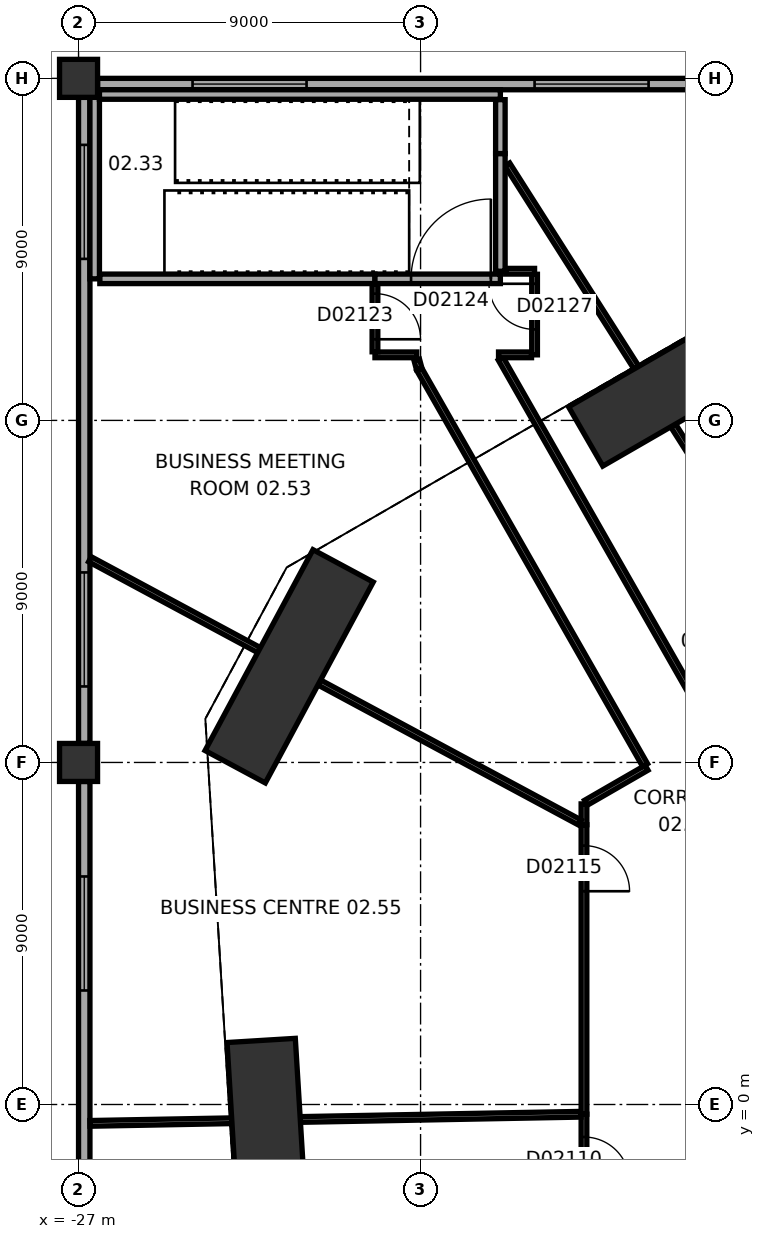
"""IFC4 building model, lengths in metres.
Left out: names, types, materials, properties, quantities, classifications, styles, units other than length and angle.
Written with IfcOpenShell. Run it as: python <this file> out.ifc"""

import sys

from ifc_helpers import new_model, si_unit, direction, frame, frame_2d, origin, origin_2d, place, context, subcontext, project, spatial, rectangle, extrude, element, fill, save


model = new_model("IFC4")
c1 = context("Model", 3, precision=1e-05, world=origin(), true_north=direction((0.0, 1.0)))
c2 = subcontext(c1, "Body", "Model", "MODEL_VIEW")
j1 = project(units=[si_unit("LENGTHUNIT", "METRE"), si_unit("PLANEANGLEUNIT", "RADIAN")], contexts=[c1])
p1 = place(None, origin())
s1 = spatial("IfcSite", under=j1, at=p1, CompositionType="ELEMENT")
p2 = place(p1, origin())
s2 = spatial("IfcBuilding", under=s1, at=p2, CompositionType="ELEMENT")
p3 = place(p2, frame((0.0, 0.0, 13.0)))
s3 = spatial("IfcBuildingStorey", under=s2, at=p3, CompositionType="ELEMENT", Elevation=13.0)
p4 = place(p3, frame((-11.837, 18.627, 0.0), z_axis=(0.0, 0.0, 1.0), x_axis=(-0.866028021766, -0.499995465495, 0.0)))
e1 = element("IfcColumn", 1, at=p4, inside=s3, PredefinedType="COLUMN", context=c2, shape_type="SweptSolid", body=[
    extrude(rectangle(XDim=4.2, YDim=1.8, at=origin_2d()), origin(), (0.0, 0.0, 1.0), 8.0),
])
p5 = place(p3, frame((-21.458, 11.53, 0.0), z_axis=(0.0, 0.0, 1.0), x_axis=(-0.473316592293, -0.880892390397, 0.0)))
e2 = element("IfcColumn", 2, at=p5, inside=s3, PredefinedType="COLUMN", context=c2, shape_type="SweptSolid", body=[
    extrude(rectangle(XDim=6.0, YDim=1.8, at=origin_2d()), origin(), (0.0, 0.0, 1.0), 8.0),
])
p6 = place(p3, frame((-22.066, -0.411, 0.0), z_axis=(0.0, 0.0, 1.0), x_axis=(0.061046797461, -0.99813490497, 0.0)))
e3 = element("IfcColumn", 3, at=p6, inside=s3, PredefinedType="COLUMN", context=c2, shape_type="SweptSolid", body=[
    extrude(rectangle(XDim=4.2, YDim=1.8, at=origin_2d()), origin(), (0.0, 0.0, 1.0), 8.0),
])
for number, where, z_axis, x_axis in (
    (4, (-27.0, 9.0, 0.0), (0.0, 0.0, 1.0), (1.0, 0.0, 0.0)),
    (5, (-27.0, 27.0, 0.0), (0.0, 0.0, 1.0), (1.0, 0.0, 0.0)),
):
    element("IfcColumn", number, at=place(p3, frame(where, z_axis=z_axis, x_axis=x_axis)), inside=s3, PredefinedType="COLUMN", context=c2, shape_type="SweptSolid", body=[
        extrude(rectangle(XDim=1.0, YDim=1.0, at=origin_2d()), origin(), (0.0, 0.0, 1.0), 8.0),
    ])
p7 = place(p3, frame((-9.5, 26.85, 0.0), z_axis=(0.0, 0.0, 1.0), x_axis=(-1.0, 0.0, 0.0)))
e6 = element("IfcWall", 6, at=p7, inside=s3, PredefinedType="STANDARD", context=c2, shape_type="SweptSolid", body=[
    extrude(rectangle(XDim=17.0, YDim=0.3, at=frame_2d((8.5, 0.0))), origin(), (0.0, 0.0, 1.0), 6.5),
])
p8 = place(p7, frame((2.5, 0.0, 1.0)))
e7 = element("IfcOpeningElement", 7, at=p8, cuts=e6, PredefinedType="OPENING", context=c2, shape_type="SweptSolid", body=[
    extrude(rectangle(XDim=3.0, YDim=4.0, at=frame_2d((1.5, 2.0))), frame((0.0, 0.16, 0.0), z_axis=(0.0, -1.0, 0.0), x_axis=(1.0, 0.0, 0.0)), (0.0, 0.0, 1.0), 0.32),
])
p9 = place(p7, frame((11.5, 0.0, 1.0)))
e8 = element("IfcOpeningElement", 8, at=p9, cuts=e6, PredefinedType="OPENING", context=c2, shape_type="SweptSolid", body=[
    extrude(rectangle(XDim=3.0, YDim=4.0, at=frame_2d((1.5, 2.0))), frame((0.0, 0.16, 0.0), z_axis=(0.0, -1.0, 0.0), x_axis=(1.0, 0.0, 0.0)), (0.0, 0.0, 1.0), 0.32),
])
p10 = place(p3, frame((-26.85, 26.5, 0.0), z_axis=(0.0, 0.0, 1.0), x_axis=(0.0, -1.0, 0.0)))
e9 = element("IfcWall", 9, at=p10, inside=s3, PredefinedType="STANDARD", context=c2, shape_type="SweptSolid", body=[
    extrude(rectangle(XDim=17.0, YDim=0.3, at=frame_2d((8.5, 0.0))), origin(), (0.0, 0.0, 1.0), 6.5),
])
p11 = place(p10, frame((1.25, 0.0, 1.0)))
e10 = element("IfcOpeningElement", 10, at=p11, cuts=e9, PredefinedType="OPENING", context=c2, shape_type="SweptSolid", body=[
    extrude(rectangle(XDim=3.0, YDim=4.0, at=frame_2d((1.5, 2.0))), frame((0.0, 0.16, 0.0), z_axis=(0.0, -1.0, 0.0), x_axis=(1.0, 0.0, 0.0)), (0.0, 0.0, 1.0), 0.32),
])
p12 = place(p10, frame((12.5, 0.0, 1.0)))
e11 = element("IfcOpeningElement", 11, at=p12, cuts=e9, PredefinedType="OPENING", context=c2, shape_type="SweptSolid", body=[
    extrude(rectangle(XDim=3.0, YDim=4.0, at=frame_2d((1.5, 2.0))), frame((0.0, 0.16, 0.0), z_axis=(0.0, -1.0, 0.0), x_axis=(1.0, 0.0, 0.0)), (0.0, 0.0, 1.0), 0.32),
])
p13 = place(p3, frame((-26.85, 8.5, 0.0), z_axis=(0.0, 0.0, 1.0), x_axis=(0.0, -1.0, 0.0)))
e12 = element("IfcWall", 12, at=p13, inside=s3, PredefinedType="STANDARD", context=c2, shape_type="SweptSolid", body=[
    extrude(rectangle(XDim=17.0, YDim=0.3, at=frame_2d((8.5, 0.0))), origin(), (0.0, 0.0, 1.0), 6.5),
])
p14 = place(p13, frame((2.5, 0.0, 1.0)))
e13 = element("IfcOpeningElement", 13, at=p14, cuts=e12, PredefinedType="OPENING", context=c2, shape_type="SweptSolid", body=[
    extrude(rectangle(XDim=3.0, YDim=4.0, at=frame_2d((1.5, 2.0))), frame((0.0, 0.16, 0.0), z_axis=(0.0, -1.0, 0.0), x_axis=(1.0, 0.0, 0.0)), (0.0, 0.0, 1.0), 0.32),
])
p15 = place(p13, frame((11.5, 0.0, 1.0)))
e14 = element("IfcOpeningElement", 14, at=p15, cuts=e12, PredefinedType="OPENING", context=c2, shape_type="SweptSolid", body=[
    extrude(rectangle(XDim=3.0, YDim=4.0, at=frame_2d((1.5, 2.0))), frame((0.0, 0.16, 0.0), z_axis=(0.0, -1.0, 0.0), x_axis=(1.0, 0.0, 0.0)), (0.0, 0.0, 1.0), 0.32),
])
p16 = place(p3, frame((-13.7, -7.909, 0.0), z_axis=(0.0, 0.0, 1.0), x_axis=(0.0, 1.0, 0.0)))
e15 = element("IfcWall", 15, at=p16, inside=s3, PredefinedType="PARTITIONING", context=c2, shape_type="SweptSolid", body=[
    extrude(rectangle(XDim=7.655, YDim=0.15, at=frame_2d((3.827, 0.0))), origin(), (0.0, 0.0, 1.0), 7.7),
])
p17 = place(p16, frame((5.854, 0.0, 0.0)))
e16 = element("IfcOpeningElement", 16, at=p17, cuts=e15, PredefinedType="OPENING", context=c2, shape_type="SweptSolid", body=[
    extrude(rectangle(XDim=1.2, YDim=2.1, at=frame_2d((0.6, 1.05))), frame((0.0, 0.085, 0.0), z_axis=(0.0, -1.0, 0.0), x_axis=(1.0, 0.0, 0.0)), (0.0, 0.0, 1.0), 0.17),
])
p18 = place(p3, frame((-22.967, -0.427, 0.0), z_axis=(0.0, 0.0, 1.0), x_axis=(-0.999826372694, -0.018633959993, 0.0)))
e17 = element("IfcWall", 17, at=p18, inside=s3, PredefinedType="PARTITIONING", context=c2, shape_type="SweptSolid", body=[
    extrude(rectangle(XDim=3.734, YDim=0.15, at=frame_2d((1.867, 0.0))), origin(), (0.0, 0.0, 1.0), 7.7),
])
p19 = place(p3, frame((-13.78, -0.257, 0.0), z_axis=(0.0, 0.0, 1.0), x_axis=(-0.999826849708, -0.018608347649, 0.0)))
e18 = element("IfcWall", 18, at=p19, inside=s3, PredefinedType="PARTITIONING", context=c2, shape_type="SweptSolid", body=[
    extrude(rectangle(XDim=7.386, YDim=0.15, at=frame_2d((3.693, 0.0))), origin(), (0.0, 0.0, 1.0), 7.7),
])
p20 = place(p3, frame((-13.7, -0.255, 0.0), z_axis=(0.0, 0.0, 1.0), x_axis=(0.0, 1.0, 0.0)))
e19 = element("IfcWall", 19, at=p20, inside=s3, PredefinedType="PARTITIONING", context=c2, shape_type="SweptSolid", body=[
    extrude(rectangle(XDim=7.616, YDim=0.15, at=frame_2d((3.808, 0.0))), origin(), (0.0, 0.0, 1.0), 7.7),
])
p21 = place(p20, frame((5.866, 0.0, 0.0)))
e20 = element("IfcOpeningElement", 20, at=p21, cuts=e19, PredefinedType="OPENING", context=c2, shape_type="SweptSolid", body=[
    extrude(rectangle(XDim=1.2, YDim=2.1, at=frame_2d((0.6, 1.05))), frame((0.0, 0.085, 0.0), z_axis=(0.0, -1.0, 0.0), x_axis=(1.0, 0.0, 0.0)), (0.0, 0.0, 1.0), 0.17),
])
p22 = place(p3, frame((-13.7, 7.362, 0.0), z_axis=(0.0, 0.0, 1.0), x_axis=(0.0, 1.0, 0.0)))
e21 = element("IfcWall", 21, at=p22, inside=s3, PredefinedType="PARTITIONING", context=c2, shape_type="SweptSolid", body=[
    extrude(rectangle(XDim=0.548, YDim=0.15, at=frame_2d((0.274, 0.0))), origin(), (0.0, 0.0, 1.0), 7.7),
])
p23 = place(p3, frame((-13.806, 7.418, 0.0), z_axis=(0.0, 0.0, 1.0), x_axis=(-0.880891557551, 0.473318142305, 0.0)))
e22 = element("IfcWall", 22, at=p23, inside=s3, PredefinedType="PARTITIONING", context=c2, shape_type="SweptSolid", body=[
    extrude(rectangle(XDim=7.787, YDim=0.15, at=frame_2d((3.894, 0.0))), origin(), (0.0, 0.0, 1.0), 7.7),
])
p24 = place(p3, frame((-13.648, 7.939, 0.0), z_axis=(0.0, 0.0, 1.0), x_axis=(0.866024486176, 0.500001589341, 0.0)))
e23 = element("IfcWall", 23, at=p24, inside=s3, PredefinedType="PARTITIONING", context=c2, shape_type="SweptSolid", body=[
    extrude(rectangle(XDim=1.842, YDim=0.15, at=frame_2d((0.921, 0.0))), origin(), (0.0, 0.0, 1.0), 7.7),
])
p25 = place(p3, frame((-12.092, 8.93, 0.0), z_axis=(0.0, 0.0, 1.0), x_axis=(-0.495564220718, 0.868571299977, 0.0)))
e24 = element("IfcWall", 24, at=p25, inside=s3, PredefinedType="PARTITIONING", context=c2, shape_type="SweptSolid", body=[
    extrude(rectangle(XDim=11.988, YDim=0.15, at=frame_2d((5.994, 0.0))), origin(), (0.0, 0.0, 1.0), 7.7),
])
p26 = place(p3, frame((-7.397, 11.641, 0.0), z_axis=(0.0, 0.0, 1.0), x_axis=(-0.536312130721, 0.844019726334, 0.0)))
e25 = element("IfcWall", 25, at=p26, inside=s3, PredefinedType="PARTITIONING", context=c2, shape_type="SweptSolid", body=[
    extrude(rectangle(XDim=7.376, YDim=0.15, at=frame_2d((3.688, 0.0))), origin(), (0.0, 0.0, 1.0), 7.7),
])
p27 = place(p3, frame((-22.251, 11.956, 0.0), z_axis=(0.0, 0.0, 1.0), x_axis=(-0.880902248523, 0.473298244817, 0.0)))
e26 = element("IfcWall", 26, at=p27, inside=s3, PredefinedType="PARTITIONING", context=c2, shape_type="SweptSolid", body=[
    extrude(rectangle(XDim=5.051, YDim=0.15, at=frame_2d((2.525, 0.0))), origin(), (0.0, 0.0, 1.0), 7.7),
])
p28 = place(p3, frame((-18.038, 19.362, 0.0), z_axis=(0.0, 0.0, 1.0), x_axis=(-0.257536433885, 0.966268588552, 0.0)))
e27 = element("IfcWall", 27, at=p28, inside=s3, PredefinedType="PARTITIONING", context=c2, shape_type="SweptSolid", body=[
    extrude(rectangle(XDim=0.241, YDim=0.15, at=frame_2d((0.12, 0.0))), origin(), (0.0, 0.0, 1.0), 7.7),
])
p29 = place(p3, frame((-12.32, 19.387, 0.0), z_axis=(0.0, 0.0, 1.0), x_axis=(-0.536309341483, 0.844021498682, 0.0)))
e28 = element("IfcWall", 28, at=p29, inside=s3, PredefinedType="PARTITIONING", context=c2, shape_type="SweptSolid", body=[
    extrude(rectangle(XDim=6.335, YDim=0.15, at=frame_2d((3.168, 0.0))), origin(), (0.0, 0.0, 1.0), 7.7),
])
p30 = place(p3, frame((-15.889, 19.621, 0.0), z_axis=(0.0, 0.0, 1.0), x_axis=(0.495540263005, -0.868584968636, 0.0)))
e29 = element("IfcWall", 29, at=p30, inside=s3, PredefinedType="PARTITIONING", context=c2, shape_type="SweptSolid", body=[
    extrude(rectangle(XDim=11.157, YDim=0.15, at=frame_2d((5.579, 0.0))), origin(), (0.0, 0.0, 1.0), 7.7),
])
p31 = place(p3, frame((-18.1, 19.725, 0.0), z_axis=(0.0, 0.0, 1.0), x_axis=(-1.0, 0.0, 0.0)))
e30 = element("IfcWall", 30, at=p31, inside=s3, PredefinedType="PARTITIONING", context=c2, shape_type="SweptSolid", body=[
    extrude(rectangle(XDim=1.1, YDim=0.15, at=frame_2d((0.55, 0.0))), origin(), (0.0, 0.0, 1.0), 7.7),
])
p32 = place(p3, frame((-15.08, 19.725, 0.0), z_axis=(0.0, 0.0, 1.0), x_axis=(-1.0, 0.0, 0.0)))
e31 = element("IfcWall", 31, at=p32, inside=s3, PredefinedType="PARTITIONING", context=c2, shape_type="SweptSolid", body=[
    extrude(rectangle(XDim=0.868, YDim=0.15, at=frame_2d((0.434, 0.0))), origin(), (0.0, 0.0, 1.0), 7.7),
])
p33 = place(p3, frame((-19.2, 19.805, 0.0), z_axis=(0.0, 0.0, 1.0), x_axis=(0.0, 1.0, 0.0)))
e32 = element("IfcWall", 32, at=p33, inside=s3, PredefinedType="PARTITIONING", context=c2, shape_type="SweptSolid", body=[
    extrude(rectangle(XDim=1.78, YDim=0.15, at=frame_2d((0.89, 0.0))), origin(), (0.0, 0.0, 1.0), 7.7),
])
p34 = place(p33, frame((0.33, 0.0, 0.0)))
e33 = element("IfcOpeningElement", 33, at=p34, cuts=e32, PredefinedType="OPENING", context=c2, shape_type="SweptSolid", body=[
    extrude(rectangle(XDim=1.2, YDim=2.1, at=frame_2d((0.6, 1.05))), frame((0.0, 0.085, 0.0), z_axis=(0.0, -1.0, 0.0), x_axis=(1.0, 0.0, 0.0)), (0.0, 0.0, 1.0), 0.17),
])
p35 = place(p3, frame((-19.2, 21.725, 0.0), z_axis=(0.0, 0.0, 1.0), x_axis=(-1.0, 0.0, 0.0)))
e34 = element("IfcWall", 34, at=p35, inside=s3, PredefinedType="SOLIDWALL", context=c2, shape_type="SweptSolid", body=[
    extrude(rectangle(XDim=7.24, YDim=0.25, at=frame_2d((3.62, 0.0))), origin(), (0.0, 0.0, 1.0), 7.7),
])
p36 = place(p3, frame((-15.9, 21.725, 0.0), z_axis=(0.0, 0.0, 1.0), x_axis=(-1.0, 0.0, 0.0)))
e35 = element("IfcWall", 35, at=p36, inside=s3, PredefinedType="SOLIDWALL", context=c2, shape_type="SweptSolid", body=[
    extrude(rectangle(XDim=3.3, YDim=0.25, at=frame_2d((1.65, 0.0))), origin(), (0.0, 0.0, 1.0), 7.7),
])
p37 = place(p36, frame((0.25, 0.0, 0.0)))
e36 = element("IfcOpeningElement", 36, at=p37, cuts=e35, PredefinedType="OPENING", context=c2, shape_type="SweptSolid", body=[
    extrude(rectangle(XDim=2.1, YDim=2.4, at=frame_2d((1.05, 1.2))), frame((0.0, 0.135, 0.0), z_axis=(0.0, -1.0, 0.0), x_axis=(1.0, 0.0, 0.0)), (0.0, 0.0, 1.0), 0.27),
])
p38 = place(p3, frame((-15.0, 21.845, 0.0), z_axis=(0.0, 0.0, 1.0), x_axis=(0.0, -1.0, 0.0)))
e37 = element("IfcWall", 37, at=p38, inside=s3, PredefinedType="PARTITIONING", context=c2, shape_type="SweptSolid", body=[
    extrude(rectangle(XDim=2.12, YDim=0.15, at=frame_2d((1.06, 0.0))), origin(), (0.0, 0.0, 1.0), 7.7),
])
p39 = place(p38, frame((0.25, 0.0, 0.0)))
e38 = element("IfcOpeningElement", 38, at=p39, cuts=e37, PredefinedType="OPENING", context=c2, shape_type="SweptSolid", body=[
    extrude(rectangle(XDim=1.2, YDim=2.1, at=frame_2d((0.6, 1.05))), frame((0.0, 0.085, 0.0), z_axis=(0.0, -1.0, 0.0), x_axis=(1.0, 0.0, 0.0)), (0.0, 0.0, 1.0), 0.17),
])
p40 = place(p3, frame((-15.76, 21.925, 0.0), z_axis=(0.0, 0.0, 1.0), x_axis=(1.0, 0.0, 0.0)))
e39 = element("IfcWall", 39, at=p40, inside=s3, PredefinedType="PARTITIONING", context=c2, shape_type="SweptSolid", body=[
    extrude(rectangle(XDim=0.76, YDim=0.15, at=frame_2d((0.38, 0.0))), origin(), (0.0, 0.0, 1.0), 7.7),
])
p41 = place(p3, frame((-15.9, 25.021, 0.0), z_axis=(0.0, 0.0, 1.0), x_axis=(0.0, -1.0, 0.0)))
e40 = element("IfcWall", 40, at=p41, inside=s3, PredefinedType="SOLIDWALL", context=c2, shape_type="SweptSolid", body=[
    extrude(rectangle(XDim=3.096, YDim=0.25, at=frame_2d((1.548, 0.0))), origin(), (0.0, 0.0, 1.0), 7.7),
])
p42 = place(p3, frame((-15.9, 26.44, 0.0), z_axis=(0.0, 0.0, 1.0), x_axis=(0.0, -1.0, 0.0)))
e41 = element("IfcWall", 41, at=p42, inside=s3, PredefinedType="SOLIDWALL", context=c2, shape_type="SweptSolid", body=[
    extrude(rectangle(XDim=1.418, YDim=0.25, at=frame_2d((0.709, 0.0))), origin(), (0.0, 0.0, 1.0), 7.7),
])
p43 = place(p3, frame((-26.575, 21.725, 0.0), z_axis=(0.0, 0.0, 1.0), x_axis=(0.0, 1.0, 0.0)))
e42 = element("IfcWall", 42, at=p43, inside=s3, PredefinedType="SOLIDWALL", context=c2, shape_type="SweptSolid", body=[
    extrude(rectangle(XDim=4.975, YDim=0.25, at=frame_2d((2.487, 0.0))), origin(), (0.0, 0.0, 1.0), 7.7),
])
p44 = place(p3, frame((-26.45, 26.575, 0.0), z_axis=(0.0, 0.0, 1.0), x_axis=(1.0, 0.0, 0.0)))
e43 = element("IfcWall", 43, at=p44, inside=s3, PredefinedType="SOLIDWALL", context=c2, shape_type="SweptSolid", body=[
    extrude(rectangle(XDim=10.55, YDim=0.25, at=frame_2d((5.275, 0.0))), origin(), (0.0, 0.0, 1.0), 7.7),
])
p45 = place(p8, origin())
e44 = element("IfcWindow", 44, at=p45, inside=s3, PartitioningType="SINGLE_PANEL", PredefinedType="WINDOW", context=c2, shape_type="SweptSolid", body=[
    extrude(rectangle(XDim=3.0, YDim=4.0, at=frame_2d((1.5, 2.0))), frame((0.0, 0.03, 0.0), z_axis=(0.0, -1.0, 0.0), x_axis=(1.0, 0.0, 0.0)), (0.0, 0.0, 1.0), 0.06),
])
fill(e7, e44)
p46 = place(p9, origin())
e45 = element("IfcWindow", 45, at=p46, inside=s3, PartitioningType="SINGLE_PANEL", PredefinedType="WINDOW", context=c2, shape_type="SweptSolid", body=[
    extrude(rectangle(XDim=3.0, YDim=4.0, at=frame_2d((1.5, 2.0))), frame((0.0, 0.03, 0.0), z_axis=(0.0, -1.0, 0.0), x_axis=(1.0, 0.0, 0.0)), (0.0, 0.0, 1.0), 0.06),
])
fill(e8, e45)
p47 = place(p11, origin())
e46 = element("IfcWindow", 46, at=p47, inside=s3, PartitioningType="SINGLE_PANEL", PredefinedType="WINDOW", context=c2, shape_type="SweptSolid", body=[
    extrude(rectangle(XDim=3.0, YDim=4.0, at=frame_2d((1.5, 2.0))), frame((0.0, 0.03, 0.0), z_axis=(0.0, -1.0, 0.0), x_axis=(1.0, 0.0, 0.0)), (0.0, 0.0, 1.0), 0.06),
])
fill(e10, e46)
p48 = place(p12, origin())
e47 = element("IfcWindow", 47, at=p48, inside=s3, PartitioningType="SINGLE_PANEL", PredefinedType="WINDOW", context=c2, shape_type="SweptSolid", body=[
    extrude(rectangle(XDim=3.0, YDim=4.0, at=frame_2d((1.5, 2.0))), frame((0.0, 0.03, 0.0), z_axis=(0.0, -1.0, 0.0), x_axis=(1.0, 0.0, 0.0)), (0.0, 0.0, 1.0), 0.06),
])
fill(e11, e47)
p49 = place(p14, origin())
e48 = element("IfcWindow", 48, at=p49, inside=s3, PartitioningType="SINGLE_PANEL", PredefinedType="WINDOW", context=c2, shape_type="SweptSolid", body=[
    extrude(rectangle(XDim=3.0, YDim=4.0, at=frame_2d((1.5, 2.0))), frame((0.0, 0.03, 0.0), z_axis=(0.0, -1.0, 0.0), x_axis=(1.0, 0.0, 0.0)), (0.0, 0.0, 1.0), 0.06),
])
fill(e13, e48)
p50 = place(p17, origin())
e49 = element("IfcDoor", 49, at=p50, inside=s3, OperationType="SINGLE_SWING_LEFT", PredefinedType="DOOR", context=c2, shape_type="SweptSolid", body=[
    extrude(rectangle(XDim=1.2, YDim=2.1, at=frame_2d((0.6, 1.05))), frame((0.0, 0.025, 0.0), z_axis=(0.0, -1.0, 0.0), x_axis=(1.0, 0.0, 0.0)), (0.0, 0.0, 1.0), 0.05),
])
fill(e16, e49)
p51 = place(p21, origin())
e50 = element("IfcDoor", 50, at=p51, inside=s3, OperationType="SINGLE_SWING_LEFT", PredefinedType="DOOR", context=c2, shape_type="SweptSolid", body=[
    extrude(rectangle(XDim=1.2, YDim=2.1, at=frame_2d((0.6, 1.05))), frame((0.0, 0.025, 0.0), z_axis=(0.0, -1.0, 0.0), x_axis=(1.0, 0.0, 0.0)), (0.0, 0.0, 1.0), 0.05),
])
fill(e20, e50)
p52 = place(p34, origin())
e51 = element("IfcDoor", 51, at=p52, inside=s3, OperationType="SINGLE_SWING_LEFT", PredefinedType="DOOR", context=c2, shape_type="SweptSolid", body=[
    extrude(rectangle(XDim=1.2, YDim=2.1, at=frame_2d((0.6, 1.05))), frame((0.0, 0.025, 0.0), z_axis=(0.0, -1.0, 0.0), x_axis=(1.0, 0.0, 0.0)), (0.0, 0.0, 1.0), 0.05),
])
fill(e33, e51)
p53 = place(p37, frame((2.1, 0.0, 0.0), z_axis=(0.0, 0.0, 1.0), x_axis=(-1.0, 0.0, 0.0)))
e52 = element("IfcDoor", 52, at=p53, inside=s3, OperationType="DOUBLE_DOOR_SINGLE_SWING", PredefinedType="DOOR", context=c2, shape_type="SweptSolid", body=[
    extrude(rectangle(XDim=2.1, YDim=2.4, at=frame_2d((1.05, 1.2))), frame((0.0, 0.025, 0.0), z_axis=(0.0, -1.0, 0.0), x_axis=(1.0, 0.0, 0.0)), (0.0, 0.0, 1.0), 0.05),
])
fill(e36, e52)
p54 = place(p39, origin())
e53 = element("IfcDoor", 53, at=p54, inside=s3, OperationType="SINGLE_SWING_LEFT", PredefinedType="DOOR", context=c2, shape_type="SweptSolid", body=[
    extrude(rectangle(XDim=1.2, YDim=2.1, at=frame_2d((0.6, 1.05))), frame((0.0, 0.025, 0.0), z_axis=(0.0, -1.0, 0.0), x_axis=(1.0, 0.0, 0.0)), (0.0, 0.0, 1.0), 0.05),
])
fill(e38, e53)
save(model, sys.argv[1])
